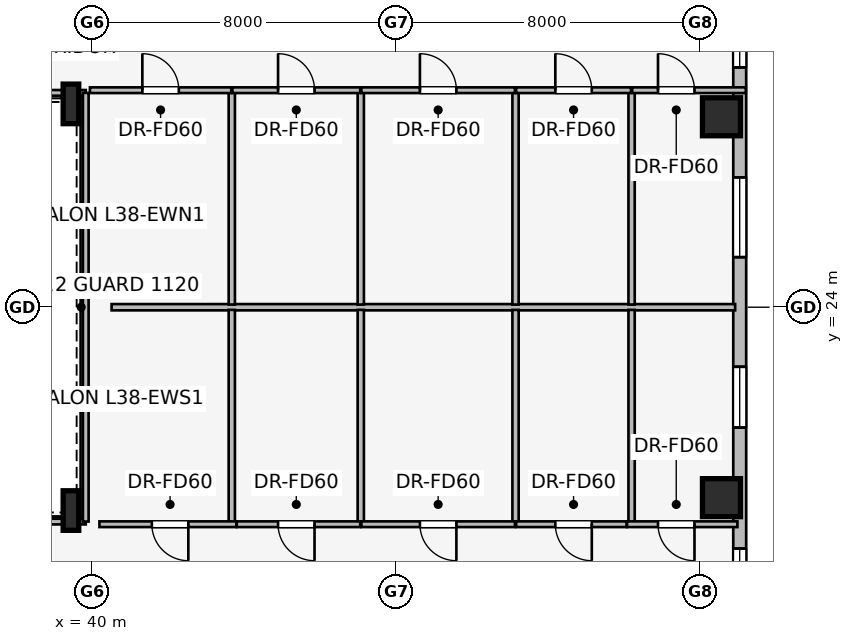
"""IFC4 building model, lengths in metres.
Left out: names, types, materials, properties, quantities, classifications, styles, units other than length and angle.
Written with IfcOpenShell. Run it as: python <this file> out.ifc"""

import sys

from ifc_helpers import new_model, si_unit, direction, frame, frame_2d, origin, origin_2d, place, context, subcontext, project, spatial, rectangle, i_section, extrude, element, fill, save


model = new_model("IFC4")
c1 = context("Model", 3, precision=1e-05, world=origin(), true_north=direction((0.0, 1.0)))
c2 = subcontext(c1, "Body", "Model", "MODEL_VIEW")
j1 = project(units=[si_unit("LENGTHUNIT", "METRE"), si_unit("PLANEANGLEUNIT", "RADIAN")], contexts=[c1])
p1 = place(None, origin())
s1 = spatial("IfcSite", under=j1, at=p1, CompositionType="ELEMENT")
p2 = place(p1, origin())
s2 = spatial("IfcBuilding", under=s1, at=p2, CompositionType="ELEMENT")
p3 = place(p2, frame((0.0, 0.0, 142.95)))
s3 = spatial("IfcBuildingStorey", under=s2, at=p3, CompositionType="ELEMENT", Elevation=142.95)
for number, where, z_axis, x_axis in (
    (1, (56.568, 18.989, 0.0), (0.0, 0.0, 1.0), (1.0, 0.0, 0.0)),
    (2, (56.568, 29.011, 0.0), (0.0, 0.0, 1.0), (1.0, 0.0, 0.0)),
):
    element("IfcColumn", number, at=place(p3, frame(where, z_axis=z_axis, x_axis=x_axis)), inside=s3, PredefinedType="COLUMN", context=c2, shape_type="SweptSolid", body=[
        extrude(rectangle(XDim=1.0, YDim=1.0, at=origin_2d()), origin(), (0.0, 0.0, 1.0), 3.45),
    ])
for number, where, z_axis, x_axis in (
    (3, (39.45, 18.65, 0.0), (0.0, 0.0, 1.0), (1.0, 0.0, 0.0)),
    (4, (39.45, 29.35, 0.0), (0.0, 0.0, 1.0), (1.0, 0.0, 0.0)),
):
    element("IfcColumn", number, at=place(p3, frame(where, z_axis=z_axis, x_axis=x_axis)), inside=s3, PredefinedType="COLUMN", context=c2, shape_type="SweptSolid", body=[
        extrude(i_section(OverallWidth=0.41, OverallDepth=1.041, WebThickness=0.031, FlangeThickness=0.056, at=origin_2d()), origin(), (0.0, 0.0, 1.0), 3.45),
    ])
p4 = place(p3, frame((57.048, 32.352, 0.0), z_axis=(0.0, 0.0, 1.0), x_axis=(0.0, -1.0, 0.0)))
e5 = element("IfcWall", 5, at=p4, inside=s3, PredefinedType="STANDARD", context=c2, shape_type="SweptSolid", body=[
    extrude(rectangle(XDim=16.704, YDim=0.34, at=frame_2d((8.352, 0.0))), origin(), (0.0, 0.0, 1.0), 3.16),
])
p5 = place(p4, frame((0.992, 0.0, 0.75)))
e6 = element("IfcOpeningElement", 6, at=p5, cuts=e5, PredefinedType="OPENING", context=c2, shape_type="SweptSolid", body=[
    extrude(rectangle(XDim=1.05, YDim=1.4, at=frame_2d((0.525, 0.7))), frame((0.0, 0.18, 0.0), z_axis=(0.0, -1.0, 0.0), x_axis=(1.0, 0.0, 0.0)), (0.0, 0.0, 1.0), 0.36),
])
p6 = place(p4, frame((4.935, 0.0, 0.75)))
e7 = element("IfcOpeningElement", 7, at=p6, cuts=e5, PredefinedType="OPENING", context=c2, shape_type="SweptSolid", body=[
    extrude(rectangle(XDim=2.1, YDim=1.5, at=frame_2d((1.05, 0.75))), frame((0.0, 0.18, 0.0), z_axis=(0.0, -1.0, 0.0), x_axis=(1.0, 0.0, 0.0)), (0.0, 0.0, 1.0), 0.36),
])
p7 = place(p4, frame((9.919, 0.0, 0.75)))
e8 = element("IfcOpeningElement", 8, at=p7, cuts=e5, PredefinedType="OPENING", context=c2, shape_type="SweptSolid", body=[
    extrude(rectangle(XDim=1.6, YDim=1.55, at=frame_2d((0.8, 0.775))), frame((0.0, 0.18, 0.0), z_axis=(0.0, -1.0, 0.0), x_axis=(1.0, 0.0, 0.0)), (0.0, 0.0, 1.0), 0.36),
])
p8 = place(p4, frame((14.702, 0.0, 0.75)))
e9 = element("IfcOpeningElement", 9, at=p8, cuts=e5, PredefinedType="OPENING", context=c2, shape_type="SweptSolid", body=[
    extrude(rectangle(XDim=1.05, YDim=1.4, at=frame_2d((0.525, 0.7))), frame((0.0, 0.18, 0.0), z_axis=(0.0, -1.0, 0.0), x_axis=(1.0, 0.0, 0.0)), (0.0, 0.0, 1.0), 0.36),
])
p9 = place(p3, frame((27.55, 18.36, 0.0), z_axis=(0.0, 0.0, 1.0), x_axis=(1.0, 0.0, 0.0)))
e10 = element("IfcWall", 10, at=p9, inside=s3, PredefinedType="PARTITIONING", context=c2, shape_type="SweptSolid", body=[
    extrude(rectangle(XDim=12.29, YDim=0.15, at=frame_2d((6.145, 0.0))), origin(), (0.0, 0.0, 1.0), 2.301),
])
p10 = place(p3, frame((39.84, 29.64, 0.0), z_axis=(0.0, 0.0, 1.0), x_axis=(-1.0, 0.0, 0.0)))
e11 = element("IfcWall", 11, at=p10, inside=s3, PredefinedType="PARTITIONING", context=c2, shape_type="SweptSolid", body=[
    extrude(rectangle(XDim=12.2, YDim=0.15, at=frame_2d((6.1, 0.0))), origin(), (0.0, 0.0, 1.0), 2.301),
])
p11 = place(p3, frame((39.84, 18.36, 0.0), z_axis=(0.0, 0.0, 1.0), x_axis=(0.0, 1.0, 0.0)))
e12 = element("IfcWall", 12, at=p11, inside=s3, PredefinedType="PARTITIONING", context=c2, shape_type="SweptSolid", body=[
    extrude(rectangle(XDim=11.28, YDim=0.15, at=frame_2d((5.64, 0.0))), origin(), (0.0, 0.0, 1.0), 3.16),
])
p12 = place(p3, frame((40.52, 24.0, 0.0), z_axis=(0.0, 0.0, 1.0), x_axis=(1.0, 0.0, 0.0)))
e13 = element("IfcWall", 13, at=p12, inside=s3, PredefinedType="PARTITIONING", context=c2, shape_type="SweptSolid", body=[
    extrude(rectangle(XDim=16.408, YDim=0.165, at=frame_2d((8.204, 0.0))), origin(), (0.0, 0.0, 1.0), 3.16),
])
for number, where, z_axis, x_axis in (
    (14, (43.683, 24.07, 0.0), (0.0, 0.0, 1.0), (0.0, 1.0, 0.0)),
    (15, (47.077, 24.07, 0.0), (0.0, 0.0, 1.0), (0.0, 1.0, 0.0)),
    (16, (51.149, 24.07, 0.0), (0.0, 0.0, 1.0), (0.0, 1.0, 0.0)),
    (17, (54.203, 24.07, 0.0), (0.0, 0.0, 1.0), (0.0, 1.0, 0.0)),
):
    element("IfcWall", number, at=place(p3, frame(where, z_axis=z_axis, x_axis=x_axis)), inside=s3, PredefinedType="PARTITIONING", context=c2, shape_type="SweptSolid", body=[
        extrude(rectangle(XDim=5.64, YDim=0.165, at=frame_2d((2.82, 0.0))), origin(), (0.0, 0.0, 1.0), 3.16),
    ])
p13 = place(p3, frame((39.95, 29.71, 0.0), z_axis=(0.0, 0.0, 1.0), x_axis=(1.0, 0.0, 0.0)))
e18 = element("IfcWall", 18, at=p13, inside=s3, PredefinedType="PARTITIONING", context=c2, shape_type="SweptSolid", body=[
    extrude(rectangle(XDim=3.718, YDim=0.15, at=frame_2d((1.859, 0.0))), origin(), (0.0, 0.0, 1.0), 3.16),
])
p14 = place(p13, frame((1.379, 0.0, 0.0)))
e19 = element("IfcOpeningElement", 19, at=p14, cuts=e18, PredefinedType="OPENING", context=c2, shape_type="SweptSolid", body=[
    extrude(rectangle(XDim=0.96, YDim=2.0, at=frame_2d((0.48, 1.0))), frame((0.0, 0.085, 0.0), z_axis=(0.0, -1.0, 0.0), x_axis=(1.0, 0.0, 0.0)), (0.0, 0.0, 1.0), 0.17),
])
p15 = place(p3, frame((43.698, 29.71, 0.0), z_axis=(0.0, 0.0, 1.0), x_axis=(1.0, 0.0, 0.0)))
e20 = element("IfcWall", 20, at=p15, inside=s3, PredefinedType="PARTITIONING", context=c2, shape_type="SweptSolid", body=[
    extrude(rectangle(XDim=3.364, YDim=0.15, at=frame_2d((1.682, 0.0))), origin(), (0.0, 0.0, 1.0), 3.16),
])
p16 = place(p15, frame((1.202, 0.0, 0.0)))
e21 = element("IfcOpeningElement", 21, at=p16, cuts=e20, PredefinedType="OPENING", context=c2, shape_type="SweptSolid", body=[
    extrude(rectangle(XDim=0.96, YDim=2.0, at=frame_2d((0.48, 1.0))), frame((0.0, 0.085, 0.0), z_axis=(0.0, -1.0, 0.0), x_axis=(1.0, 0.0, 0.0)), (0.0, 0.0, 1.0), 0.17),
])
p17 = place(p3, frame((47.092, 29.71, 0.0), z_axis=(0.0, 0.0, 1.0), x_axis=(1.0, 0.0, 0.0)))
e22 = element("IfcWall", 22, at=p17, inside=s3, PredefinedType="PARTITIONING", context=c2, shape_type="SweptSolid", body=[
    extrude(rectangle(XDim=4.042, YDim=0.15, at=frame_2d((2.021, 0.0))), origin(), (0.0, 0.0, 1.0), 3.16),
])
p18 = place(p17, frame((1.541, 0.0, 0.0)))
e23 = element("IfcOpeningElement", 23, at=p18, cuts=e22, PredefinedType="OPENING", context=c2, shape_type="SweptSolid", body=[
    extrude(rectangle(XDim=0.96, YDim=2.0, at=frame_2d((0.48, 1.0))), frame((0.0, 0.085, 0.0), z_axis=(0.0, -1.0, 0.0), x_axis=(1.0, 0.0, 0.0)), (0.0, 0.0, 1.0), 0.17),
])
p19 = place(p3, frame((51.164, 29.71, 0.0), z_axis=(0.0, 0.0, 1.0), x_axis=(1.0, 0.0, 0.0)))
e24 = element("IfcWall", 24, at=p19, inside=s3, PredefinedType="PARTITIONING", context=c2, shape_type="SweptSolid", body=[
    extrude(rectangle(XDim=3.024, YDim=0.15, at=frame_2d((1.512, 0.0))), origin(), (0.0, 0.0, 1.0), 3.16),
])
p20 = place(p19, frame((1.032, 0.0, 0.0)))
e25 = element("IfcOpeningElement", 25, at=p20, cuts=e24, PredefinedType="OPENING", context=c2, shape_type="SweptSolid", body=[
    extrude(rectangle(XDim=0.96, YDim=2.0, at=frame_2d((0.48, 1.0))), frame((0.0, 0.085, 0.0), z_axis=(0.0, -1.0, 0.0), x_axis=(1.0, 0.0, 0.0)), (0.0, 0.0, 1.0), 0.17),
])
p21 = place(p3, frame((54.218, 29.71, 0.0), z_axis=(0.0, 0.0, 1.0), x_axis=(1.0, 0.0, 0.0)))
e26 = element("IfcWall", 26, at=p21, inside=s3, PredefinedType="PARTITIONING", context=c2, shape_type="SweptSolid", body=[
    extrude(rectangle(XDim=2.99, YDim=0.15, at=frame_2d((1.495, 0.0))), origin(), (0.0, 0.0, 1.0), 3.16),
])
p22 = place(p21, frame((0.68, 0.0, 0.0)))
e27 = element("IfcOpeningElement", 27, at=p22, cuts=e26, PredefinedType="OPENING", context=c2, shape_type="SweptSolid", body=[
    extrude(rectangle(XDim=0.96, YDim=2.0, at=frame_2d((0.48, 1.0))), frame((0.0, 0.085, 0.0), z_axis=(0.0, -1.0, 0.0), x_axis=(1.0, 0.0, 0.0)), (0.0, 0.0, 1.0), 0.17),
])
for number, where, z_axis, x_axis in (
    (28, (43.683, 18.29, 0.0), (0.0, 0.0, 1.0), (0.0, 1.0, 0.0)),
    (29, (47.077, 18.29, 0.0), (0.0, 0.0, 1.0), (0.0, 1.0, 0.0)),
    (30, (51.149, 18.29, 0.0), (0.0, 0.0, 1.0), (0.0, 1.0, 0.0)),
    (31, (54.203, 18.29, 0.0), (0.0, 0.0, 1.0), (0.0, 1.0, 0.0)),
):
    element("IfcWall", number, at=place(p3, frame(where, z_axis=z_axis, x_axis=x_axis)), inside=s3, PredefinedType="PARTITIONING", context=c2, shape_type="SweptSolid", body=[
        extrude(rectangle(XDim=5.64, YDim=0.165, at=frame_2d((2.82, 0.0))), origin(), (0.0, 0.0, 1.0), 3.16),
    ])
p23 = place(p3, frame((43.803, 18.29, 0.0), z_axis=(0.0, 0.0, 1.0), x_axis=(-1.0, 0.0, 0.0)))
e32 = element("IfcWall", 32, at=p23, inside=s3, PredefinedType="PARTITIONING", context=c2, shape_type="SweptSolid", body=[
    extrude(rectangle(XDim=3.603, YDim=0.15, at=frame_2d((1.802, 0.0))), origin(), (0.0, 0.0, 1.0), 3.16),
])
p24 = place(p23, frame((1.264, 0.0, 0.0)))
e33 = element("IfcOpeningElement", 33, at=p24, cuts=e32, PredefinedType="OPENING", context=c2, shape_type="SweptSolid", body=[
    extrude(rectangle(XDim=0.96, YDim=2.0, at=frame_2d((0.48, 1.0))), frame((0.0, 0.085, 0.0), z_axis=(0.0, -1.0, 0.0), x_axis=(1.0, 0.0, 0.0)), (0.0, 0.0, 1.0), 0.17),
])
p25 = place(p3, frame((47.062, 18.29, 0.0), z_axis=(0.0, 0.0, 1.0), x_axis=(-1.0, 0.0, 0.0)))
e34 = element("IfcWall", 34, at=p25, inside=s3, PredefinedType="PARTITIONING", context=c2, shape_type="SweptSolid", body=[
    extrude(rectangle(XDim=3.249, YDim=0.15, at=frame_2d((1.625, 0.0))), origin(), (0.0, 0.0, 1.0), 3.16),
])
p26 = place(p25, frame((1.202, 0.0, 0.0)))
e35 = element("IfcOpeningElement", 35, at=p26, cuts=e34, PredefinedType="OPENING", context=c2, shape_type="SweptSolid", body=[
    extrude(rectangle(XDim=0.96, YDim=2.0, at=frame_2d((0.48, 1.0))), frame((0.0, 0.085, 0.0), z_axis=(0.0, -1.0, 0.0), x_axis=(1.0, 0.0, 0.0)), (0.0, 0.0, 1.0), 0.17),
])
p27 = place(p3, frame((51.134, 18.29, 0.0), z_axis=(0.0, 0.0, 1.0), x_axis=(-1.0, 0.0, 0.0)))
e36 = element("IfcWall", 36, at=p27, inside=s3, PredefinedType="PARTITIONING", context=c2, shape_type="SweptSolid", body=[
    extrude(rectangle(XDim=4.042, YDim=0.15, at=frame_2d((2.021, 0.0))), origin(), (0.0, 0.0, 1.0), 3.16),
])
p28 = place(p27, frame((1.541, 0.0, 0.0)))
e37 = element("IfcOpeningElement", 37, at=p28, cuts=e36, PredefinedType="OPENING", context=c2, shape_type="SweptSolid", body=[
    extrude(rectangle(XDim=0.96, YDim=2.0, at=frame_2d((0.48, 1.0))), frame((0.0, 0.085, 0.0), z_axis=(0.0, -1.0, 0.0), x_axis=(1.0, 0.0, 0.0)), (0.0, 0.0, 1.0), 0.17),
])
p29 = place(p3, frame((54.073, 18.29, 0.0), z_axis=(0.0, 0.0, 1.0), x_axis=(-1.0, 0.0, 0.0)))
e38 = element("IfcWall", 38, at=p29, inside=s3, PredefinedType="PARTITIONING", context=c2, shape_type="SweptSolid", body=[
    extrude(rectangle(XDim=2.909, YDim=0.15, at=frame_2d((1.455, 0.0))), origin(), (0.0, 0.0, 1.0), 3.16),
])
p30 = place(p29, frame((0.917, 0.0, 0.0)))
e39 = element("IfcOpeningElement", 39, at=p30, cuts=e38, PredefinedType="OPENING", context=c2, shape_type="SweptSolid", body=[
    extrude(rectangle(XDim=0.96, YDim=2.0, at=frame_2d((0.48, 1.0))), frame((0.0, 0.085, 0.0), z_axis=(0.0, -1.0, 0.0), x_axis=(1.0, 0.0, 0.0)), (0.0, 0.0, 1.0), 0.17),
])
p31 = place(p3, frame((56.988, 18.29, 0.0), z_axis=(0.0, 0.0, 1.0), x_axis=(-1.0, 0.0, 0.0)))
e40 = element("IfcWall", 40, at=p31, inside=s3, PredefinedType="PARTITIONING", context=c2, shape_type="SweptSolid", body=[
    extrude(rectangle(XDim=2.905, YDim=0.15, at=frame_2d((1.453, 0.0))), origin(), (0.0, 0.0, 1.0), 3.16),
])
p32 = place(p31, frame((1.13, 0.0, 0.0)))
e41 = element("IfcOpeningElement", 41, at=p32, cuts=e40, PredefinedType="OPENING", context=c2, shape_type="SweptSolid", body=[
    extrude(rectangle(XDim=0.96, YDim=2.0, at=frame_2d((0.48, 1.0))), frame((0.0, 0.085, 0.0), z_axis=(0.0, -1.0, 0.0), x_axis=(1.0, 0.0, 0.0)), (0.0, 0.0, 1.0), 0.17),
])
p33 = place(p5, origin())
e42 = element("IfcWindow", 42, at=p33, inside=s3, PartitioningType="SINGLE_PANEL", PredefinedType="WINDOW", context=c2, shape_type="SweptSolid", body=[
    extrude(rectangle(XDim=1.05, YDim=1.4, at=frame_2d((0.525, 0.7))), frame((0.0, 0.03, 0.0), z_axis=(0.0, -1.0, 0.0), x_axis=(1.0, 0.0, 0.0)), (0.0, 0.0, 1.0), 0.06),
])
fill(e6, e42)
p34 = place(p6, origin())
e43 = element("IfcWindow", 43, at=p34, inside=s3, PartitioningType="SINGLE_PANEL", PredefinedType="WINDOW", context=c2, shape_type="SweptSolid", body=[
    extrude(rectangle(XDim=2.1, YDim=1.5, at=frame_2d((1.05, 0.75))), frame((0.0, 0.03, 0.0), z_axis=(0.0, -1.0, 0.0), x_axis=(1.0, 0.0, 0.0)), (0.0, 0.0, 1.0), 0.06),
])
fill(e7, e43)
p35 = place(p7, origin())
e44 = element("IfcWindow", 44, at=p35, inside=s3, PartitioningType="SINGLE_PANEL", PredefinedType="WINDOW", context=c2, shape_type="SweptSolid", body=[
    extrude(rectangle(XDim=1.6, YDim=1.55, at=frame_2d((0.8, 0.775))), frame((0.0, 0.03, 0.0), z_axis=(0.0, -1.0, 0.0), x_axis=(1.0, 0.0, 0.0)), (0.0, 0.0, 1.0), 0.06),
])
fill(e8, e44)
p36 = place(p8, origin())
e45 = element("IfcWindow", 45, at=p36, inside=s3, PartitioningType="SINGLE_PANEL", PredefinedType="WINDOW", context=c2, shape_type="SweptSolid", body=[
    extrude(rectangle(XDim=1.05, YDim=1.4, at=frame_2d((0.525, 0.7))), frame((0.0, 0.03, 0.0), z_axis=(0.0, -1.0, 0.0), x_axis=(1.0, 0.0, 0.0)), (0.0, 0.0, 1.0), 0.06),
])
fill(e9, e45)
p37 = place(p14, origin())
e46 = element("IfcDoor", 46, at=p37, inside=s3, OperationType="SINGLE_SWING_LEFT", PredefinedType="DOOR", context=c2, shape_type="SweptSolid", body=[
    extrude(rectangle(XDim=0.96, YDim=2.0, at=frame_2d((0.48, 1.0))), frame((0.0, 0.025, 0.0), z_axis=(0.0, -1.0, 0.0), x_axis=(1.0, 0.0, 0.0)), (0.0, 0.0, 1.0), 0.05),
])
fill(e19, e46)
p38 = place(p16, origin())
e47 = element("IfcDoor", 47, at=p38, inside=s3, OperationType="SINGLE_SWING_LEFT", PredefinedType="DOOR", context=c2, shape_type="SweptSolid", body=[
    extrude(rectangle(XDim=0.96, YDim=2.0, at=frame_2d((0.48, 1.0))), frame((0.0, 0.025, 0.0), z_axis=(0.0, -1.0, 0.0), x_axis=(1.0, 0.0, 0.0)), (0.0, 0.0, 1.0), 0.05),
])
fill(e21, e47)
p39 = place(p18, origin())
e48 = element("IfcDoor", 48, at=p39, inside=s3, OperationType="SINGLE_SWING_LEFT", PredefinedType="DOOR", context=c2, shape_type="SweptSolid", body=[
    extrude(rectangle(XDim=0.96, YDim=2.0, at=frame_2d((0.48, 1.0))), frame((0.0, 0.025, 0.0), z_axis=(0.0, -1.0, 0.0), x_axis=(1.0, 0.0, 0.0)), (0.0, 0.0, 1.0), 0.05),
])
fill(e23, e48)
p40 = place(p20, origin())
e49 = element("IfcDoor", 49, at=p40, inside=s3, OperationType="SINGLE_SWING_LEFT", PredefinedType="DOOR", context=c2, shape_type="SweptSolid", body=[
    extrude(rectangle(XDim=0.96, YDim=2.0, at=frame_2d((0.48, 1.0))), frame((0.0, 0.025, 0.0), z_axis=(0.0, -1.0, 0.0), x_axis=(1.0, 0.0, 0.0)), (0.0, 0.0, 1.0), 0.05),
])
fill(e25, e49)
p41 = place(p22, origin())
e50 = element("IfcDoor", 50, at=p41, inside=s3, OperationType="SINGLE_SWING_LEFT", PredefinedType="DOOR", context=c2, shape_type="SweptSolid", body=[
    extrude(rectangle(XDim=0.96, YDim=2.0, at=frame_2d((0.48, 1.0))), frame((0.0, 0.025, 0.0), z_axis=(0.0, -1.0, 0.0), x_axis=(1.0, 0.0, 0.0)), (0.0, 0.0, 1.0), 0.05),
])
fill(e27, e50)
p42 = place(p24, origin())
e51 = element("IfcDoor", 51, at=p42, inside=s3, OperationType="SINGLE_SWING_LEFT", PredefinedType="DOOR", context=c2, shape_type="SweptSolid", body=[
    extrude(rectangle(XDim=0.96, YDim=2.0, at=frame_2d((0.48, 1.0))), frame((0.0, 0.025, 0.0), z_axis=(0.0, -1.0, 0.0), x_axis=(1.0, 0.0, 0.0)), (0.0, 0.0, 1.0), 0.05),
])
fill(e33, e51)
p43 = place(p26, origin())
e52 = element("IfcDoor", 52, at=p43, inside=s3, OperationType="SINGLE_SWING_LEFT", PredefinedType="DOOR", context=c2, shape_type="SweptSolid", body=[
    extrude(rectangle(XDim=0.96, YDim=2.0, at=frame_2d((0.48, 1.0))), frame((0.0, 0.025, 0.0), z_axis=(0.0, -1.0, 0.0), x_axis=(1.0, 0.0, 0.0)), (0.0, 0.0, 1.0), 0.05),
])
fill(e35, e52)
p44 = place(p28, origin())
e53 = element("IfcDoor", 53, at=p44, inside=s3, OperationType="SINGLE_SWING_LEFT", PredefinedType="DOOR", context=c2, shape_type="SweptSolid", body=[
    extrude(rectangle(XDim=0.96, YDim=2.0, at=frame_2d((0.48, 1.0))), frame((0.0, 0.025, 0.0), z_axis=(0.0, -1.0, 0.0), x_axis=(1.0, 0.0, 0.0)), (0.0, 0.0, 1.0), 0.05),
])
fill(e37, e53)
p45 = place(p30, origin())
e54 = element("IfcDoor", 54, at=p45, inside=s3, OperationType="SINGLE_SWING_LEFT", PredefinedType="DOOR", context=c2, shape_type="SweptSolid", body=[
    extrude(rectangle(XDim=0.96, YDim=2.0, at=frame_2d((0.48, 1.0))), frame((0.0, 0.025, 0.0), z_axis=(0.0, -1.0, 0.0), x_axis=(1.0, 0.0, 0.0)), (0.0, 0.0, 1.0), 0.05),
])
fill(e39, e54)
p46 = place(p32, origin())
e55 = element("IfcDoor", 55, at=p46, inside=s3, OperationType="SINGLE_SWING_LEFT", PredefinedType="DOOR", context=c2, shape_type="SweptSolid", body=[
    extrude(rectangle(XDim=0.96, YDim=2.0, at=frame_2d((0.48, 1.0))), frame((0.0, 0.025, 0.0), z_axis=(0.0, -1.0, 0.0), x_axis=(1.0, 0.0, 0.0)), (0.0, 0.0, 1.0), 0.05),
])
fill(e41, e55)
save(model, sys.argv[1])
